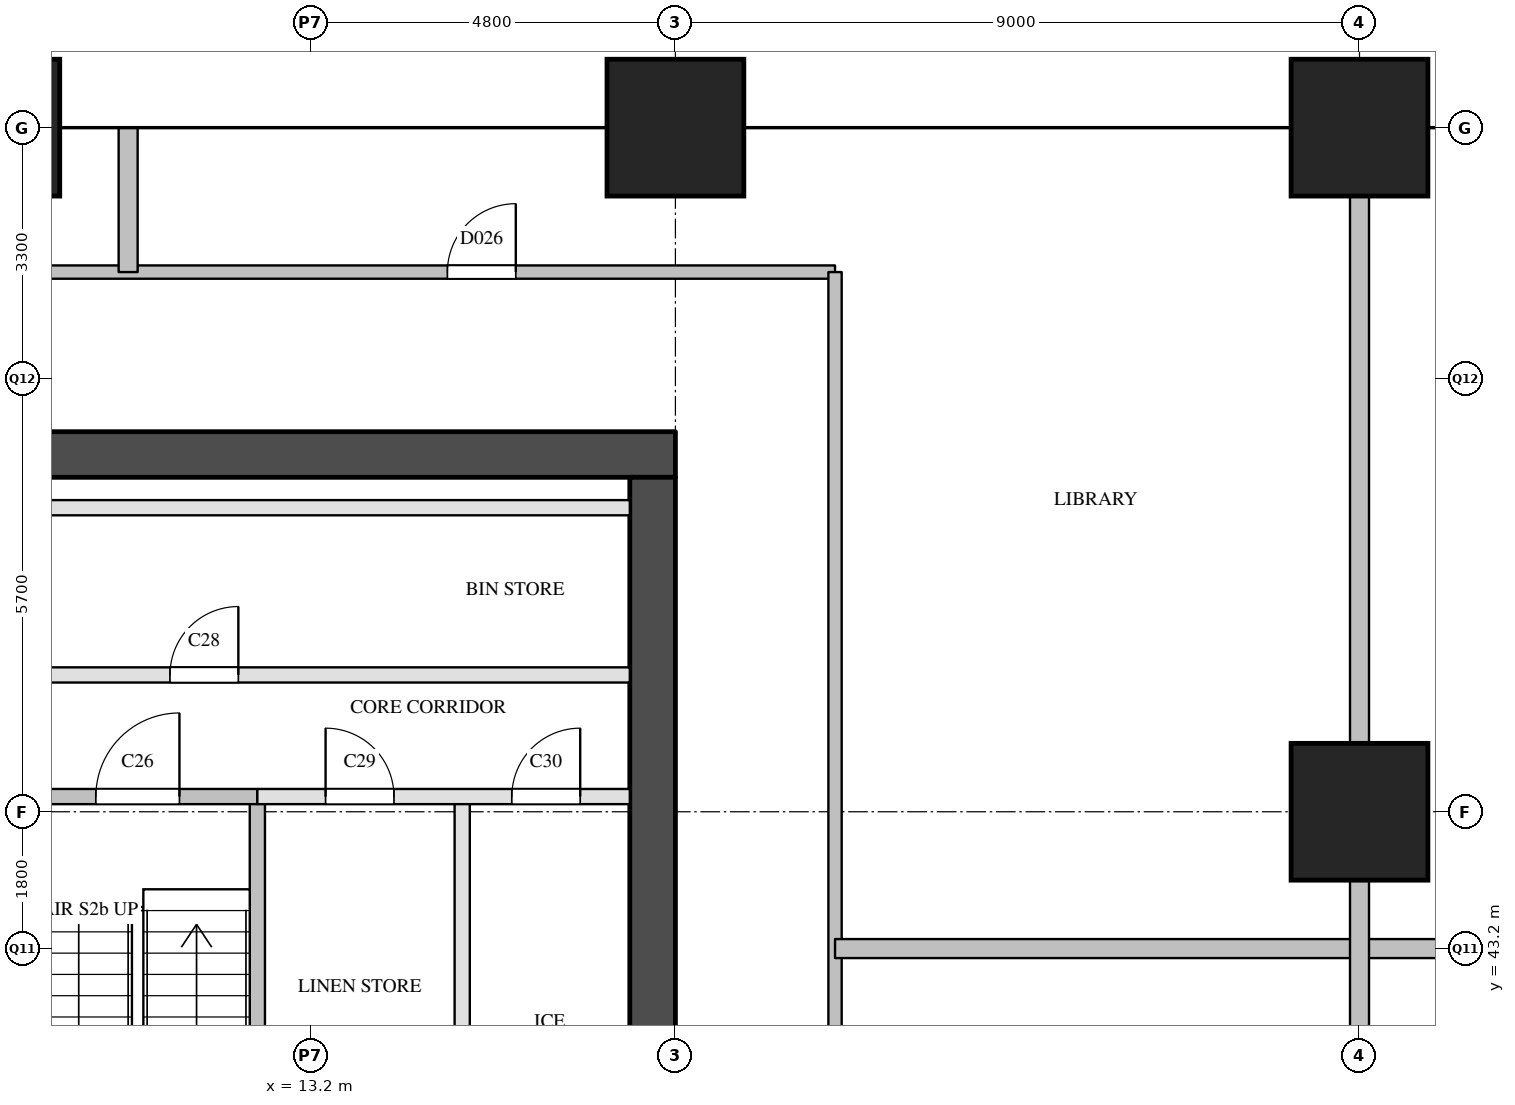
"""IFC4 building model, lengths in metres.
Left out: names, types, materials, properties, quantities, classifications, styles, units other than length and angle.
Written with IfcOpenShell. Run it as: python <this file> out.ifc"""

import sys

from ifc_helpers import new_model, si_unit, direction, frame, frame_2d, origin, origin_2d, place, context, subcontext, project, spatial, rectangle, extrude, element, fill, save


model = new_model("IFC4")
c1 = context("Model", 3, precision=1e-05, world=origin(), true_north=direction((0.0, 1.0)))
c2 = subcontext(c1, "Body", "Model", "MODEL_VIEW")
j1 = project(units=[si_unit("LENGTHUNIT", "METRE"), si_unit("PLANEANGLEUNIT", "RADIAN")], contexts=[c1])
p1 = place(None, origin())
s1 = spatial("IfcSite", under=j1, at=p1, CompositionType="ELEMENT")
p2 = place(p1, origin())
s2 = spatial("IfcBuilding", under=s1, at=p2, CompositionType="ELEMENT")
p3 = place(p2, frame((0.0, 0.0, 61.4)))
s3 = spatial("IfcBuildingStorey", under=s2, at=p3, CompositionType="ELEMENT", Elevation=61.4)
for number, where, z_axis, x_axis in (
    (1, (9.0, 54.0, 0.0), (0.0, 0.0, 1.0), (1.0, 0.0, 0.0)),
    (2, (18.0, 54.0, 0.0), (0.0, 0.0, 1.0), (1.0, 0.0, 0.0)),
    (3, (27.0, 45.0, 0.0), (0.0, 0.0, 1.0), (1.0, 0.0, 0.0)),
    (4, (27.0, 54.0, 0.0), (0.0, 0.0, 1.0), (1.0, 0.0, 0.0)),
):
    element("IfcColumn", number, at=place(p3, frame(where, z_axis=z_axis, x_axis=x_axis)), inside=s3, PredefinedType="COLUMN", context=c2, shape_type="SweptSolid", body=[
        extrude(rectangle(XDim=1.8, YDim=1.8, at=origin_2d()), origin(), (0.0, 0.0, 1.0), 3.8),
    ])
p4 = place(p3, frame((5.6, 49.7, 0.0), z_axis=(0.0, 0.0, 1.0), x_axis=(1.0, 0.0, 0.0)))
e5 = element("IfcWall", 5, at=p4, inside=s3, PredefinedType="SHEAR", context=c2, shape_type="SweptSolid", body=[
    extrude(rectangle(XDim=12.4, YDim=0.6, at=frame_2d((6.2, 0.0))), origin(), (0.0, 0.0, 1.0), 3.5),
])
p5 = place(p3, frame((17.7, 29.1, 0.0), z_axis=(0.0, 0.0, 1.0), x_axis=(0.0, 1.0, 0.0)))
e6 = element("IfcWall", 6, at=p5, inside=s3, PredefinedType="SHEAR", context=c2, shape_type="SweptSolid", body=[
    extrude(rectangle(XDim=20.3, YDim=0.6, at=frame_2d((10.15, 0.0))), origin(), (0.0, 0.0, 1.0), 3.5),
])
p6 = place(p5, frame((1.25, 0.0, 0.0)))
e7 = element("IfcOpeningElement", 7, at=p6, cuts=e6, PredefinedType="OPENING", context=c2, shape_type="SweptSolid", body=[
    extrude(rectangle(XDim=0.7, YDim=2.1, at=frame_2d((0.35, 1.05))), frame((0.0, 0.31, 0.0), z_axis=(0.0, -1.0, 0.0), x_axis=(1.0, 0.0, 0.0)), (0.0, 0.0, 1.0), 0.62),
])
p7 = place(p5, frame((7.05, 0.0, 0.0)))
e8 = element("IfcOpeningElement", 8, at=p7, cuts=e6, PredefinedType="OPENING", context=c2, shape_type="SweptSolid", body=[
    extrude(rectangle(XDim=0.7, YDim=2.1, at=frame_2d((0.35, 1.05))), frame((0.0, 0.31, 0.0), z_axis=(0.0, -1.0, 0.0), x_axis=(1.0, 0.0, 0.0)), (0.0, 0.0, 1.0), 0.62),
])
p8 = place(p3, frame((12.5, 40.9, 0.0), z_axis=(0.0, 0.0, 1.0), x_axis=(0.0, 1.0, 0.0)))
e9 = element("IfcWall", 9, at=p8, inside=s3, PredefinedType="SOLIDWALL", context=c2, shape_type="SweptSolid", body=[
    extrude(rectangle(XDim=4.3, YDim=0.2, at=frame_2d((2.15, 0.0))), origin(), (0.0, 0.0, 1.0), 3.5),
])
p9 = place(p3, frame((15.195, 39.0, 0.0), z_axis=(0.0, 0.0, 1.0), x_axis=(0.0, 1.0, 0.0)))
e10 = element("IfcWall", 10, at=p9, inside=s3, PredefinedType="PARTITIONING", context=c2, shape_type="SweptSolid", body=[
    extrude(rectangle(XDim=6.2, YDim=0.2, at=frame_2d((3.1, 0.0))), origin(), (0.0, 0.0, 1.0), 3.5),
])
p10 = place(p3, frame((12.5, 45.2, 0.0), z_axis=(0.0, 0.0, 1.0), x_axis=(1.0, 0.0, 0.0)))
e11 = element("IfcWall", 11, at=p10, inside=s3, PredefinedType="PARTITIONING", context=c2, shape_type="SweptSolid", body=[
    extrude(rectangle(XDim=4.9, YDim=0.2, at=frame_2d((2.45, 0.0))), origin(), (0.0, 0.0, 1.0), 3.5),
])
p11 = place(p10, frame((0.897, 0.0, 0.0)))
e12 = element("IfcOpeningElement", 12, at=p11, cuts=e11, PredefinedType="OPENING", context=c2, shape_type="SweptSolid", body=[
    extrude(rectangle(XDim=0.9, YDim=2.1, at=frame_2d((0.45, 1.05))), frame((0.0, 0.11, 0.0), z_axis=(0.0, -1.0, 0.0), x_axis=(1.0, 0.0, 0.0)), (0.0, 0.0, 1.0), 0.22),
])
p12 = place(p10, frame((3.347, 0.0, 0.0)))
e13 = element("IfcOpeningElement", 13, at=p12, cuts=e11, PredefinedType="OPENING", context=c2, shape_type="SweptSolid", body=[
    extrude(rectangle(XDim=0.9, YDim=2.1, at=frame_2d((0.45, 1.05))), frame((0.0, 0.11, 0.0), z_axis=(0.0, -1.0, 0.0), x_axis=(1.0, 0.0, 0.0)), (0.0, 0.0, 1.0), 0.22),
])
p13 = place(p3, frame((6.2, 45.2, 0.0), z_axis=(0.0, 0.0, 1.0), x_axis=(1.0, 0.0, 0.0)))
e14 = element("IfcWall", 14, at=p13, inside=s3, PredefinedType="SOLIDWALL", context=c2, shape_type="SweptSolid", body=[
    extrude(rectangle(XDim=6.3, YDim=0.2, at=frame_2d((3.15, 0.0))), origin(), (0.0, 0.0, 1.0), 3.5),
])
p14 = place(p13, frame((1.025, 0.0, 0.0)))
e15 = element("IfcOpeningElement", 15, at=p14, cuts=e14, PredefinedType="OPENING", context=c2, shape_type="SweptSolid", body=[
    extrude(rectangle(XDim=1.1, YDim=2.1, at=frame_2d((0.55, 1.05))), frame((0.0, 0.11, 0.0), z_axis=(0.0, -1.0, 0.0), x_axis=(1.0, 0.0, 0.0)), (0.0, 0.0, 1.0), 0.22),
])
p15 = place(p13, frame((4.175, 0.0, 0.0)))
e16 = element("IfcOpeningElement", 16, at=p15, cuts=e14, PredefinedType="OPENING", context=c2, shape_type="SweptSolid", body=[
    extrude(rectangle(XDim=1.1, YDim=2.1, at=frame_2d((0.55, 1.05))), frame((0.0, 0.11, 0.0), z_axis=(0.0, -1.0, 0.0), x_axis=(1.0, 0.0, 0.0)), (0.0, 0.0, 1.0), 0.22),
])
p16 = place(p3, frame((6.2, 46.8, 0.0), z_axis=(0.0, 0.0, 1.0), x_axis=(1.0, 0.0, 0.0)))
e17 = element("IfcWall", 17, at=p16, inside=s3, PredefinedType="PARTITIONING", context=c2, shape_type="SweptSolid", body=[
    extrude(rectangle(XDim=11.2, YDim=0.2, at=frame_2d((5.6, 0.0))), origin(), (0.0, 0.0, 1.0), 3.5),
])
p17 = place(p16, frame((5.15, 0.0, 0.0)))
e18 = element("IfcOpeningElement", 18, at=p17, cuts=e17, PredefinedType="OPENING", context=c2, shape_type="SweptSolid", body=[
    extrude(rectangle(XDim=0.9, YDim=2.1, at=frame_2d((0.45, 1.05))), frame((0.0, 0.11, 0.0), z_axis=(0.0, -1.0, 0.0), x_axis=(1.0, 0.0, 0.0)), (0.0, 0.0, 1.0), 0.22),
])
p18 = place(p3, frame((6.2, 49.0, 0.0), z_axis=(0.0, 0.0, 1.0), x_axis=(1.0, 0.0, 0.0)))
e19 = element("IfcWall", 19, at=p18, inside=s3, PredefinedType="PARTITIONING", context=c2, shape_type="SweptSolid", body=[
    extrude(rectangle(XDim=11.2, YDim=0.2, at=frame_2d((5.6, 0.0))), origin(), (0.0, 0.0, 1.0), 3.5),
])
p19 = place(p3, frame((3.5, 52.1, 0.0), z_axis=(0.0, 0.0, 1.0), x_axis=(1.0, 0.0, 0.0)))
e20 = element("IfcWall", 20, at=p19, inside=s3, PredefinedType="PARTITIONING", context=c2, shape_type="SweptSolid", body=[
    extrude(rectangle(XDim=16.6, YDim=0.175, at=frame_2d((8.3, 0.0))), origin(), (0.0, 0.0, 1.0), 3.5),
])
p20 = place(p19, frame((11.5, 0.0, 0.0)))
e21 = element("IfcOpeningElement", 21, at=p20, cuts=e20, PredefinedType="OPENING", context=c2, shape_type="SweptSolid", body=[
    extrude(rectangle(XDim=0.9, YDim=2.1, at=frame_2d((0.45, 1.05))), frame((0.0, 0.097, 0.0), z_axis=(0.0, -1.0, 0.0), x_axis=(1.0, 0.0, 0.0)), (0.0, 0.0, 1.0), 0.195),
])
p21 = place(p3, frame((20.1, 28.52, 0.0), z_axis=(0.0, 0.0, 1.0), x_axis=(0.0, 1.0, 0.0)))
e22 = element("IfcWall", 22, at=p21, inside=s3, PredefinedType="PARTITIONING", context=c2, shape_type="SweptSolid", body=[
    extrude(rectangle(XDim=23.58, YDim=0.175, at=frame_2d((11.79, 0.0))), origin(), (0.0, 0.0, 1.0), 3.5),
])
p22 = place(p21, frame((6.84, 0.0, 0.0)))
e23 = element("IfcOpeningElement", 23, at=p22, cuts=e22, PredefinedType="OPENING", context=c2, shape_type="SweptSolid", body=[
    extrude(rectangle(XDim=1.0, YDim=2.1, at=frame_2d((0.5, 1.05))), frame((0.0, 0.097, 0.0), z_axis=(0.0, -1.0, 0.0), x_axis=(1.0, 0.0, 0.0)), (0.0, 0.0, 1.0), 0.195),
])
p23 = place(p3, frame((20.1, 43.2, 0.0), z_axis=(0.0, 0.0, 1.0), x_axis=(1.0, 0.0, 0.0)))
e24 = element("IfcWall", 24, at=p23, inside=s3, PredefinedType="PARTITIONING", context=c2, shape_type="SweptSolid", body=[
    extrude(rectangle(XDim=13.8, YDim=0.25, at=frame_2d((6.9, 0.0))), origin(), (0.0, 0.0, 1.0), 2.5),
])
p24 = place(p3, frame((10.8, 52.1, 0.0), z_axis=(0.0, 0.0, 1.0), x_axis=(0.0, 1.0, 0.0)))
e25 = element("IfcWall", 25, at=p24, inside=s3, PredefinedType="PARTITIONING", context=c2, shape_type="SweptSolid", body=[
    extrude(rectangle(XDim=1.9, YDim=0.25, at=frame_2d((0.95, 0.0))), origin(), (0.0, 0.0, 1.0), 2.5),
])
p25 = place(p3, frame((27.0, 0.0, 0.0), z_axis=(0.0, 0.0, 1.0), x_axis=(0.0, 1.0, 0.0)))
e26 = element("IfcWall", 26, at=p25, inside=s3, PredefinedType="PARTITIONING", context=c2, shape_type="SweptSolid", body=[
    extrude(rectangle(XDim=54.0, YDim=0.25, at=frame_2d((27.0, 0.0))), origin(), (0.0, 0.0, 1.0), 2.5),
])
p26 = place(p15, origin())
e27 = element("IfcDoor", 27, at=p26, inside=s3, OperationType="SINGLE_SWING_RIGHT", PredefinedType="DOOR", context=c2, shape_type="SweptSolid", body=[
    extrude(rectangle(XDim=1.1, YDim=2.1, at=frame_2d((0.55, 1.05))), frame((0.0, 0.025, 0.0), z_axis=(0.0, -1.0, 0.0), x_axis=(1.0, 0.0, 0.0)), (0.0, 0.0, 1.0), 0.05),
])
fill(e16, e27)
p27 = place(p17, origin())
e28 = element("IfcDoor", 28, at=p27, inside=s3, OperationType="SINGLE_SWING_RIGHT", PredefinedType="DOOR", context=c2, shape_type="SweptSolid", body=[
    extrude(rectangle(XDim=0.9, YDim=2.1, at=frame_2d((0.45, 1.05))), frame((0.0, 0.025, 0.0), z_axis=(0.0, -1.0, 0.0), x_axis=(1.0, 0.0, 0.0)), (0.0, 0.0, 1.0), 0.05),
])
fill(e18, e28)
p28 = place(p11, origin())
e29 = element("IfcDoor", 29, at=p28, inside=s3, OperationType="SINGLE_SWING_LEFT", PredefinedType="DOOR", context=c2, shape_type="SweptSolid", body=[
    extrude(rectangle(XDim=0.9, YDim=2.1, at=frame_2d((0.45, 1.05))), frame((0.0, 0.025, 0.0), z_axis=(0.0, -1.0, 0.0), x_axis=(1.0, 0.0, 0.0)), (0.0, 0.0, 1.0), 0.05),
])
fill(e12, e29)
p29 = place(p12, origin())
e30 = element("IfcDoor", 30, at=p29, inside=s3, OperationType="SINGLE_SWING_RIGHT", PredefinedType="DOOR", context=c2, shape_type="SweptSolid", body=[
    extrude(rectangle(XDim=0.9, YDim=2.1, at=frame_2d((0.45, 1.05))), frame((0.0, 0.025, 0.0), z_axis=(0.0, -1.0, 0.0), x_axis=(1.0, 0.0, 0.0)), (0.0, 0.0, 1.0), 0.05),
])
fill(e13, e30)
p30 = place(p20, origin())
e31 = element("IfcDoor", 31, at=p30, inside=s3, OperationType="SINGLE_SWING_RIGHT", PredefinedType="DOOR", context=c2, shape_type="SweptSolid", body=[
    extrude(rectangle(XDim=0.9, YDim=2.1, at=frame_2d((0.45, 1.05))), frame((0.0, 0.025, 0.0), z_axis=(0.0, -1.0, 0.0), x_axis=(1.0, 0.0, 0.0)), (0.0, 0.0, 1.0), 0.05),
])
fill(e21, e31)
save(model, sys.argv[1])
